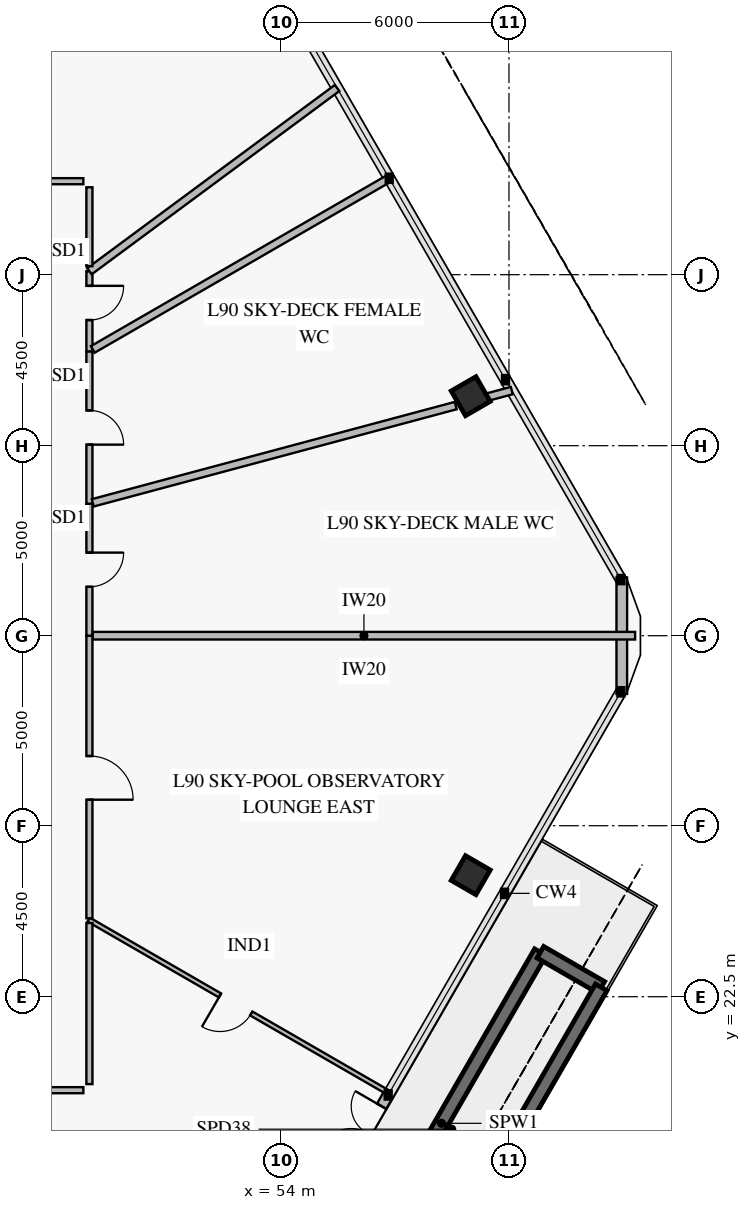
"""IFC4 building model, lengths in metres.
Left out: names, types, materials, properties, quantities, classifications, styles, units other than length and angle.
Written with IfcOpenShell. Run it as: python <this file> out.ifc"""

import sys

from ifc_helpers import new_model, si_unit, direction, frame, frame_2d, origin, origin_2d, place, context, subcontext, project, spatial, rectangle, extrude, element, fill, save


model = new_model("IFC4")
c1 = context("Model", 3, precision=1e-05, world=origin(), true_north=direction((0.0, 1.0)))
c2 = subcontext(c1, "Body", "Model", "MODEL_VIEW")
j1 = project(units=[si_unit("LENGTHUNIT", "METRE"), si_unit("PLANEANGLEUNIT", "RADIAN")], contexts=[c1])
p1 = place(None, origin())
s1 = spatial("IfcSite", under=j1, at=p1, CompositionType="ELEMENT")
p2 = place(p1, origin())
s2 = spatial("IfcBuilding", under=s1, at=p2, CompositionType="ELEMENT")
p3 = place(p2, frame((0.0, 0.0, 353.8)))
s3 = spatial("IfcBuildingStorey", under=s2, at=p3, CompositionType="ELEMENT", Elevation=353.8)
p4 = place(p3, frame((55.626, 14.665, 0.0), z_axis=(0.0, 0.0, 1.0), x_axis=(0.499989328369, 0.866031564966, 0.0)))
e1 = element("IfcWall", 1, at=p4, inside=s3, PredefinedType="SOLIDWALL", context=c2, shape_type="SweptSolid", body=[
    extrude(rectangle(XDim=10.4, YDim=0.35, at=frame_2d((5.2, 0.0))), origin(), (0.0, 0.0, 1.0), 1.4),
])
p5 = place(p3, frame((60.826, 23.671, 0.0), z_axis=(0.0, 0.0, 1.0), x_axis=(0.866033964044, -0.499985172903, 0.0)))
e2 = element("IfcWall", 2, at=p5, inside=s3, PredefinedType="SOLIDWALL", context=c2, shape_type="SweptSolid", body=[
    extrude(rectangle(XDim=1.85, YDim=0.35, at=frame_2d((0.925, 0.0))), origin(), (0.0, 0.0, 1.0), 1.4),
])
p6 = place(p3, frame((62.428, 22.746, 0.0), z_axis=(0.0, 0.0, 1.0), x_axis=(-0.500006934395, -0.866021400173, 0.0)))
e3 = element("IfcWall", 3, at=p6, inside=s3, PredefinedType="SOLIDWALL", context=c2, shape_type="SweptSolid", body=[
    extrude(rectangle(XDim=10.4, YDim=0.35, at=frame_2d((5.2, 0.0))), origin(), (0.0, 0.0, 1.0), 1.4),
])
for number, where, z_axis, x_axis in (
    (4, (58.993, 38.302, 0.0), (0.0, 0.0, 1.0), (-0.5, 0.866, 0.0)),
    (5, (58.993, 25.698, 0.0), (0.0, 0.0, 1.0), (0.5, 0.866, 0.0)),
):
    element("IfcColumn", number, at=place(p3, frame(where, z_axis=z_axis, x_axis=x_axis)), inside=s3, PredefinedType="COLUMN", context=c2, shape_type="SweptSolid", body=[
        extrude(rectangle(XDim=0.75, YDim=0.75, at=origin_2d()), origin(), (0.0, 0.0, 1.0), 3.35),
    ])
p7 = place(p3, frame((56.821, 19.915, 0.0), z_axis=(0.0, 0.0, 1.0), x_axis=(-0.500014693593, -0.866016920268, 0.0)))
e6 = element("IfcWall", 6, at=p7, inside=s3, PredefinedType="SOLIDWALL", context=c2, shape_type="SweptSolid", body=[
    extrude(rectangle(XDim=2.29, YDim=0.28, at=frame_2d((1.145, 0.0))), origin(), (0.0, 0.0, 1.0), 2.38),
])
p8 = place(p7, frame((0.345, 0.0, 0.0)))
e7 = element("IfcOpeningElement", 7, at=p8, cuts=e6, PredefinedType="OPENING", context=c2, shape_type="SweptSolid", body=[
    extrude(rectangle(XDim=1.6, YDim=2.3, at=frame_2d((0.8, 1.15))), frame((0.0, 0.152, 0.0), z_axis=(0.0, -1.0, 0.0), x_axis=(1.0, 0.0, 0.0)), (0.0, 0.0, 1.0), 0.304),
])
p9 = place(p3, frame((62.969, 33.532, 0.0), z_axis=(0.0, 0.0, 1.0), x_axis=(0.0, -1.0, 0.0)))
e8 = element("IfcWall", 8, at=p9, inside=s3, PredefinedType="SOLIDWALL", context=c2, shape_type="SweptSolid", body=[
    extrude(rectangle(XDim=3.065, YDim=0.28, at=frame_2d((1.532, 0.0))), origin(), (0.0, 0.0, 1.0), 3.35),
])
p10 = place(p3, frame((48.94, 24.529, 0.0), z_axis=(0.0, 0.0, 1.0), x_axis=(0.866028436312, -0.499994747472, 0.0)))
e9 = element("IfcWall", 9, at=p10, inside=s3, PredefinedType="PARTITIONING", context=c2, shape_type="SweptSolid", body=[
    extrude(rectangle(XDim=9.132, YDim=0.12, at=frame_2d((4.566, 0.0))), origin(), (0.0, 0.0, 1.0), 2.25),
])
p11 = place(p10, frame((3.991, 0.0, 0.0)))
e10 = element("IfcOpeningElement", 10, at=p11, cuts=e9, PredefinedType="OPENING", context=c2, shape_type="SweptSolid", body=[
    extrude(rectangle(XDim=0.95, YDim=2.1, at=frame_2d((0.475, 1.05))), frame((0.0, 0.072, 0.0), z_axis=(0.0, -1.0, 0.0), x_axis=(1.0, 0.0, 0.0)), (0.0, 0.0, 1.0), 0.144),
])
p12 = place(p3, frame((42.905, 20.04, 0.0), z_axis=(0.0, 0.0, 1.0), x_axis=(1.0, 0.0, 0.0)))
e11 = element("IfcWall", 11, at=p12, inside=s3, PredefinedType="PARTITIONING", context=c2, shape_type="SweptSolid", body=[
    extrude(rectangle(XDim=5.895, YDim=0.16, at=frame_2d((2.948, 0.0))), origin(), (0.0, 0.0, 1.0), 2.8),
])
p13 = place(p12, frame((2.372, 0.0, 0.0)))
e12 = element("IfcOpeningElement", 12, at=p13, cuts=e11, PredefinedType="OPENING", context=c2, shape_type="SweptSolid", body=[
    extrude(rectangle(XDim=1.15, YDim=2.2, at=frame_2d((0.575, 1.1))), frame((0.0, 0.092, 0.0), z_axis=(0.0, -1.0, 0.0), x_axis=(1.0, 0.0, 0.0)), (0.0, 0.0, 1.0), 0.184),
])
p14 = place(p3, frame((48.96, 24.564, 0.0), z_axis=(0.0, 0.0, 1.0), x_axis=(0.0, 1.0, 0.0)))
e13 = element("IfcWall", 13, at=p14, inside=s3, PredefinedType="PARTITIONING", context=c2, shape_type="SweptSolid", body=[
    extrude(rectangle(XDim=7.436, YDim=0.16, at=frame_2d((3.718, 0.0))), origin(), (0.0, 0.0, 1.0), 2.8),
])
p15 = place(p14, frame((3.12, 0.0, 0.0)))
e14 = element("IfcOpeningElement", 14, at=p15, cuts=e13, PredefinedType="OPENING", context=c2, shape_type="SweptSolid", body=[
    extrude(rectangle(XDim=1.15, YDim=2.2, at=frame_2d((0.575, 1.1))), frame((0.0, 0.092, 0.0), z_axis=(0.0, -1.0, 0.0), x_axis=(1.0, 0.0, 0.0)), (0.0, 0.0, 1.0), 0.184),
])
p16 = place(p3, frame((48.96, 32.0, 0.0), z_axis=(0.0, 0.0, 1.0), x_axis=(0.0, 1.0, 0.0)))
e15 = element("IfcWall", 15, at=p16, inside=s3, PredefinedType="PARTITIONING", context=c2, shape_type="SweptSolid", body=[
    extrude(rectangle(XDim=3.473, YDim=0.16, at=frame_2d((1.736, 0.0))), origin(), (0.0, 0.0, 1.0), 2.8),
])
p17 = place(p16, frame((1.286, 0.0, 0.0)))
e16 = element("IfcOpeningElement", 16, at=p17, cuts=e15, PredefinedType="OPENING", context=c2, shape_type="SweptSolid", body=[
    extrude(rectangle(XDim=0.9, YDim=2.1, at=frame_2d((0.45, 1.05))), frame((0.0, 0.092, 0.0), z_axis=(0.0, -1.0, 0.0), x_axis=(1.0, 0.0, 0.0)), (0.0, 0.0, 1.0), 0.184),
])
p18 = place(p3, frame((48.96, 35.473, 0.0), z_axis=(0.0, 0.0, 1.0), x_axis=(0.0, 1.0, 0.0)))
e17 = element("IfcWall", 17, at=p18, inside=s3, PredefinedType="PARTITIONING", context=c2, shape_type="SweptSolid", body=[
    extrude(rectangle(XDim=4.01, YDim=0.16, at=frame_2d((2.005, 0.0))), origin(), (0.0, 0.0, 1.0), 2.8),
])
p19 = place(p18, frame((1.555, 0.0, 0.0)))
e18 = element("IfcOpeningElement", 18, at=p19, cuts=e17, PredefinedType="OPENING", context=c2, shape_type="SweptSolid", body=[
    extrude(rectangle(XDim=0.9, YDim=2.1, at=frame_2d((0.45, 1.05))), frame((0.0, 0.092, 0.0), z_axis=(0.0, -1.0, 0.0), x_axis=(1.0, 0.0, 0.0)), (0.0, 0.0, 1.0), 0.184),
])
p20 = place(p3, frame((48.96, 39.482, 0.0), z_axis=(0.0, 0.0, 1.0), x_axis=(0.0, 1.0, 0.0)))
e19 = element("IfcWall", 19, at=p20, inside=s3, PredefinedType="PARTITIONING", context=c2, shape_type="SweptSolid", body=[
    extrude(rectangle(XDim=2.107, YDim=0.16, at=frame_2d((1.054, 0.0))), origin(), (0.0, 0.0, 1.0), 3.35),
])
p21 = place(p20, frame((0.824, 0.0, 0.0)))
e20 = element("IfcOpeningElement", 20, at=p21, cuts=e19, PredefinedType="OPENING", context=c2, shape_type="SweptSolid", body=[
    extrude(rectangle(XDim=0.9, YDim=2.1, at=frame_2d((0.45, 1.05))), frame((0.0, 0.092, 0.0), z_axis=(0.0, -1.0, 0.0), x_axis=(1.0, 0.0, 0.0)), (0.0, 0.0, 1.0), 0.184),
])
p22 = place(p3, frame((48.8, 43.96, 0.0), z_axis=(0.0, 0.0, 1.0), x_axis=(-1.0, 0.0, 0.0)))
e21 = element("IfcWall", 21, at=p22, inside=s3, PredefinedType="PARTITIONING", context=c2, shape_type="SweptSolid", body=[
    extrude(rectangle(XDim=15.782, YDim=0.16, at=frame_2d((7.891, 0.0))), origin(), (0.0, 0.0, 1.0), 2.8),
])
p23 = place(p22, frame((7.316, 0.0, 0.0)))
e22 = element("IfcOpeningElement", 22, at=p23, cuts=e21, PredefinedType="OPENING", context=c2, shape_type="SweptSolid", body=[
    extrude(rectangle(XDim=1.15, YDim=2.2, at=frame_2d((0.575, 1.1))), frame((0.0, 0.092, 0.0), z_axis=(0.0, -1.0, 0.0), x_axis=(1.0, 0.0, 0.0)), (0.0, 0.0, 1.0), 0.184),
])
p24 = place(p3, frame((42.956, 19.952, 0.0), z_axis=(0.0, 0.0, 1.0), x_axis=(0.499999361477, -0.866025772436, 0.0)))
e23 = element("IfcWall", 23, at=p24, inside=s3, PredefinedType="PARTITIONING", context=c2, shape_type="SweptSolid", body=[
    extrude(rectangle(XDim=13.407, YDim=0.2, at=frame_2d((6.703, 0.0))), origin(), (0.0, 0.0, 1.0), 2.77),
])
p25 = place(p3, frame((48.96, 20.2, 0.0), z_axis=(0.0, 0.0, 1.0), x_axis=(0.0, 1.0, 0.0)))
e24 = element("IfcWall", 24, at=p25, inside=s3, PredefinedType="PARTITIONING", context=c2, shape_type="SweptSolid", body=[
    extrude(rectangle(XDim=4.239, YDim=0.16, at=frame_2d((2.12, 0.0))), origin(), (0.0, 0.0, 1.0), 3.35),
])
p26 = place(p3, frame((49.048, 32.0, 0.0), z_axis=(0.0, 0.0, 1.0), x_axis=(1.0, 0.0, 0.0)))
e25 = element("IfcWall", 25, at=p26, inside=s3, PredefinedType="PARTITIONING", context=c2, shape_type="SweptSolid", body=[
    extrude(rectangle(XDim=14.271, YDim=0.2, at=frame_2d((7.135, 0.0))), origin(), (0.0, 0.0, 1.0), 2.77),
])
p27 = place(p3, frame((49.048, 35.496, 0.0), z_axis=(0.0, 0.0, 1.0), x_axis=(0.965923582375, 0.258827419358, 0.0)))
e26 = element("IfcWall", 26, at=p27, inside=s3, PredefinedType="PARTITIONING", context=c2, shape_type="SweptSolid", body=[
    extrude(rectangle(XDim=9.887, YDim=0.2, at=frame_2d((4.944, 0.0))), origin(), (0.0, 0.0, 1.0), 2.8),
])
p28 = place(p3, frame((59.388, 38.267, 0.0), z_axis=(0.0, 0.0, 1.0), x_axis=(0.965897390407, 0.258925145951, 0.0)))
e27 = element("IfcWall", 27, at=p28, inside=s3, PredefinedType="PARTITIONING", context=c2, shape_type="SweptSolid", body=[
    extrude(rectangle(XDim=0.71, YDim=0.2, at=frame_2d((0.355, 0.0))), origin(), (0.0, 0.0, 1.0), 2.922),
])
p29 = place(p3, frame((49.048, 39.533, 0.0), z_axis=(0.0, 0.0, 1.0), x_axis=(0.866019486308, 0.50001024923, 0.0)))
e28 = element("IfcWall", 28, at=p29, inside=s3, PredefinedType="PARTITIONING", context=c2, shape_type="SweptSolid", body=[
    extrude(rectangle(XDim=9.008, YDim=0.2, at=frame_2d((4.504, 0.0))), origin(), (0.0, 0.0, 1.0), 2.77),
])
p30 = place(p3, frame((48.96, 41.59, 0.0), z_axis=(0.0, 0.0, 1.0), x_axis=(0.80384621872, 0.594837168181, 0.0)))
e29 = element("IfcWall", 29, at=p30, inside=s3, PredefinedType="PARTITIONING", context=c2, shape_type="SweptSolid", body=[
    extrude(rectangle(XDim=8.108, YDim=0.2, at=frame_2d((4.054, 0.0))), origin(), (0.0, 0.0, 1.0), 2.77),
])
p31 = place(p3, frame((48.96, 41.724, 0.0), z_axis=(0.0, 0.0, 1.0), x_axis=(0.0, 1.0, 0.0)))
e30 = element("IfcWall", 30, at=p31, inside=s3, PredefinedType="PARTITIONING", context=c2, shape_type="SweptSolid", body=[
    extrude(rectangle(XDim=2.076, YDim=0.16, at=frame_2d((1.038, 0.0))), origin(), (0.0, 0.0, 1.0), 3.35),
])
p32 = place(p8, frame((1.6, 0.0, 0.0), z_axis=(0.0, 0.0, 1.0), x_axis=(-1.0, 0.0, 0.0)))
e31 = element("IfcDoor", 31, at=p32, inside=s3, OperationType="DOUBLE_DOOR_SINGLE_SWING", PredefinedType="DOOR", context=c2, shape_type="SweptSolid", body=[
    extrude(rectangle(XDim=1.6, YDim=2.3, at=frame_2d((0.8, 1.15))), frame((0.0, 0.025, 0.0), z_axis=(0.0, -1.0, 0.0), x_axis=(1.0, 0.0, 0.0)), (0.0, 0.0, 1.0), 0.05),
])
fill(e7, e31)
p33 = place(p11, frame((0.95, 0.0, 0.0), z_axis=(0.0, 0.0, 1.0), x_axis=(-1.0, 0.0, 0.0)))
e32 = element("IfcDoor", 32, at=p33, inside=s3, OperationType="SINGLE_SWING_RIGHT", PredefinedType="DOOR", context=c2, shape_type="SweptSolid", body=[
    extrude(rectangle(XDim=0.95, YDim=2.1, at=frame_2d((0.475, 1.05))), frame((0.0, 0.025, 0.0), z_axis=(0.0, -1.0, 0.0), x_axis=(1.0, 0.0, 0.0)), (0.0, 0.0, 1.0), 0.05),
])
fill(e10, e32)
p34 = place(p15, frame((1.15, 0.0, 0.0), z_axis=(0.0, 0.0, 1.0), x_axis=(-1.0, 0.0, 0.0)))
e33 = element("IfcDoor", 33, at=p34, inside=s3, OperationType="SINGLE_SWING_RIGHT", PredefinedType="DOOR", context=c2, shape_type="SweptSolid", body=[
    extrude(rectangle(XDim=1.15, YDim=2.2, at=frame_2d((0.575, 1.1))), frame((0.0, 0.025, 0.0), z_axis=(0.0, -1.0, 0.0), x_axis=(1.0, 0.0, 0.0)), (0.0, 0.0, 1.0), 0.05),
])
fill(e14, e33)
p35 = place(p17, frame((0.9, 0.0, 0.0), z_axis=(0.0, 0.0, 1.0), x_axis=(-1.0, 0.0, 0.0)))
e34 = element("IfcDoor", 34, at=p35, inside=s3, OperationType="SINGLE_SWING_LEFT", PredefinedType="DOOR", context=c2, shape_type="SweptSolid", body=[
    extrude(rectangle(XDim=0.9, YDim=2.1, at=frame_2d((0.45, 1.05))), frame((0.0, 0.025, 0.0), z_axis=(0.0, -1.0, 0.0), x_axis=(1.0, 0.0, 0.0)), (0.0, 0.0, 1.0), 0.05),
])
fill(e16, e34)
p36 = place(p19, frame((0.9, 0.0, 0.0), z_axis=(0.0, 0.0, 1.0), x_axis=(-1.0, 0.0, 0.0)))
e35 = element("IfcDoor", 35, at=p36, inside=s3, OperationType="SINGLE_SWING_RIGHT", PredefinedType="DOOR", context=c2, shape_type="SweptSolid", body=[
    extrude(rectangle(XDim=0.9, YDim=2.1, at=frame_2d((0.45, 1.05))), frame((0.0, 0.025, 0.0), z_axis=(0.0, -1.0, 0.0), x_axis=(1.0, 0.0, 0.0)), (0.0, 0.0, 1.0), 0.05),
])
fill(e18, e35)
p37 = place(p21, frame((0.9, 0.0, 0.0), z_axis=(0.0, 0.0, 1.0), x_axis=(-1.0, 0.0, 0.0)))
e36 = element("IfcDoor", 36, at=p37, inside=s3, OperationType="SINGLE_SWING_LEFT", PredefinedType="DOOR", context=c2, shape_type="SweptSolid", body=[
    extrude(rectangle(XDim=0.9, YDim=2.1, at=frame_2d((0.45, 1.05))), frame((0.0, 0.025, 0.0), z_axis=(0.0, -1.0, 0.0), x_axis=(1.0, 0.0, 0.0)), (0.0, 0.0, 1.0), 0.05),
])
fill(e20, e36)
save(model, sys.argv[1])
